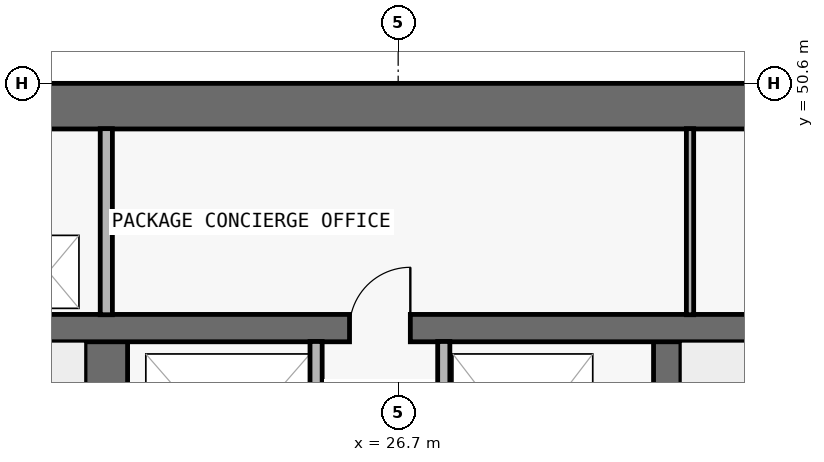
"""IFC4 building model, lengths in metres.
Left out: names, types, materials, properties, quantities, classifications, styles, units other than length and angle.
Written with IfcOpenShell. Run it as: python <this file> out.ifc"""

import sys

from ifc_helpers import new_model, si_unit, direction, frame, frame_2d, origin, place, context, subcontext, project, spatial, rectangle, extrude, element, fill, save


model = new_model("IFC4")
c1 = context("Model", 3, precision=1e-05, world=origin(), true_north=direction((0.0, 1.0)))
c2 = subcontext(c1, "Body", "Model", "MODEL_VIEW")
j1 = project(units=[si_unit("LENGTHUNIT", "METRE"), si_unit("PLANEANGLEUNIT", "RADIAN")], contexts=[c1])
p1 = place(None, origin())
s1 = spatial("IfcSite", under=j1, at=p1, CompositionType="ELEMENT")
p2 = place(p1, origin())
s2 = spatial("IfcBuilding", under=s1, at=p2, CompositionType="ELEMENT")
p3 = place(p2, frame((0.0, 0.0, 56.4)))
s3 = spatial("IfcBuildingStorey", under=s2, at=p3, CompositionType="ELEMENT", Elevation=56.4)
p4 = place(p3, frame((17.75, 50.225, 0.0), z_axis=(0.0, 0.0, 1.0), x_axis=(1.0, 0.0, 0.0)))
e1 = element("IfcWall", 1, at=p4, inside=s3, PredefinedType="SHEAR", context=c2, shape_type="SweptSolid", body=[
    extrude(rectangle(XDim=42.3, YDim=0.75, at=frame_2d((21.15, 0.0))), origin(), (0.0, 0.0, 1.0), 3.05),
])
p5 = place(p3, frame((21.9, 36.9, 0.0), z_axis=(0.0, 0.0, 1.0), x_axis=(0.0, 1.0, 0.0)))
e2 = element("IfcWall", 2, at=p5, inside=s3, PredefinedType="SHEAR", context=c2, shape_type="SweptSolid", body=[
    extrude(rectangle(XDim=9.675, YDim=0.7, at=frame_2d((4.837, 0.0))), origin(), (0.0, 0.0, 1.0), 3.05),
])
p6 = place(p5, frame((0.65, 0.0, 0.0)))
e3 = element("IfcOpeningElement", 3, at=p6, cuts=e2, PredefinedType="OPENING", context=c2, shape_type="SweptSolid", body=[
    extrude(rectangle(XDim=1.1, YDim=2.15, at=frame_2d((0.55, 1.075))), frame((0.0, 0.36, 0.0), z_axis=(0.0, -1.0, 0.0), x_axis=(1.0, 0.0, 0.0)), (0.0, 0.0, 1.0), 0.72),
])
p7 = place(p3, frame((31.125, 36.9, 0.0), z_axis=(0.0, 0.0, 1.0), x_axis=(0.0, 1.0, 0.0)))
e4 = element("IfcWall", 4, at=p7, inside=s3, PredefinedType="SHEAR", context=c2, shape_type="SweptSolid", body=[
    extrude(rectangle(XDim=9.675, YDim=0.45, at=frame_2d((4.837, 0.0))), origin(), (0.0, 0.0, 1.0), 3.05),
])
p8 = place(p3, frame((18.2, 46.575, 0.0), z_axis=(0.0, 0.0, 1.0), x_axis=(1.0, 0.0, 0.0)))
e5 = element("IfcWall", 5, at=p8, inside=s3, PredefinedType="SHEAR", context=c2, shape_type="SweptSolid", body=[
    extrude(rectangle(XDim=41.4, YDim=0.45, at=frame_2d((20.7, 0.0))), origin(), (0.0, 0.0, 1.0), 3.05),
])
p9 = place(p8, frame((7.7, 0.0, 0.0)))
e6 = element("IfcOpeningElement", 6, at=p9, cuts=e5, PredefinedType="OPENING", context=c2, shape_type="SweptSolid", body=[
    extrude(rectangle(XDim=1.0, YDim=2.2, at=frame_2d((0.5, 1.1))), frame((0.0, 0.235, 0.0), z_axis=(0.0, -1.0, 0.0), x_axis=(1.0, 0.0, 0.0)), (0.0, 0.0, 1.0), 0.47),
])
p10 = place(p8, frame((32.725, 0.0, 0.0)))
e7 = element("IfcOpeningElement", 7, at=p10, cuts=e5, PredefinedType="OPENING", context=c2, shape_type="SweptSolid", body=[
    extrude(rectangle(XDim=1.05, YDim=2.15, at=frame_2d((0.525, 1.075))), frame((0.0, 0.235, 0.0), z_axis=(0.0, -1.0, 0.0), x_axis=(1.0, 0.0, 0.0)), (0.0, 0.0, 1.0), 0.47),
])
p11 = place(p3, frame((21.9, 46.795, 0.0), z_axis=(0.0, 0.0, 1.0), x_axis=(0.0, 1.0, 0.0)))
e8 = element("IfcWall", 8, at=p11, inside=s3, PredefinedType="PARTITIONING", context=c2, shape_type="SweptSolid", body=[
    extrude(rectangle(XDim=3.06, YDim=0.2, at=frame_2d((1.53, 0.0))), origin(), (0.0, 0.0, 1.0), 3.05),
])
for number, where, z_axis, x_axis in (
    (9, (25.35, 43.17, 0.0), (0.0, 0.0, 1.0), (0.0, 1.0, 0.0)),
    (10, (27.45, 43.17, 0.0), (0.0, 0.0, 1.0), (0.0, 1.0, 0.0)),
):
    element("IfcWall", number, at=place(p3, frame(where, z_axis=z_axis, x_axis=x_axis)), inside=s3, PredefinedType="PARTITIONING", context=c2, shape_type="SweptSolid", body=[
        extrude(rectangle(XDim=3.185, YDim=0.2, at=frame_2d((1.593, 0.0))), origin(), (0.0, 0.0, 1.0), 3.05),
    ])
p12 = place(p3, frame((31.5, 46.795, 0.0), z_axis=(0.0, 0.0, 1.0), x_axis=(0.0, 1.0, 0.0)))
e11 = element("IfcWall", 11, at=p12, inside=s3, PredefinedType="PARTITIONING", context=c2, shape_type="SweptSolid", body=[
    extrude(rectangle(XDim=3.06, YDim=0.12, at=frame_2d((1.53, 0.0))), origin(), (0.0, 0.0, 1.0), 3.05),
])
p13 = place(p9, origin())
e12 = element("IfcDoor", 12, at=p13, inside=s3, OperationType="SINGLE_SWING_RIGHT", PredefinedType="DOOR", context=c2, shape_type="SweptSolid", body=[
    extrude(rectangle(XDim=1.0, YDim=2.2, at=frame_2d((0.5, 1.1))), frame((0.0, 0.025, 0.0), z_axis=(0.0, -1.0, 0.0), x_axis=(1.0, 0.0, 0.0)), (0.0, 0.0, 1.0), 0.05),
])
fill(e6, e12)
save(model, sys.argv[1])
